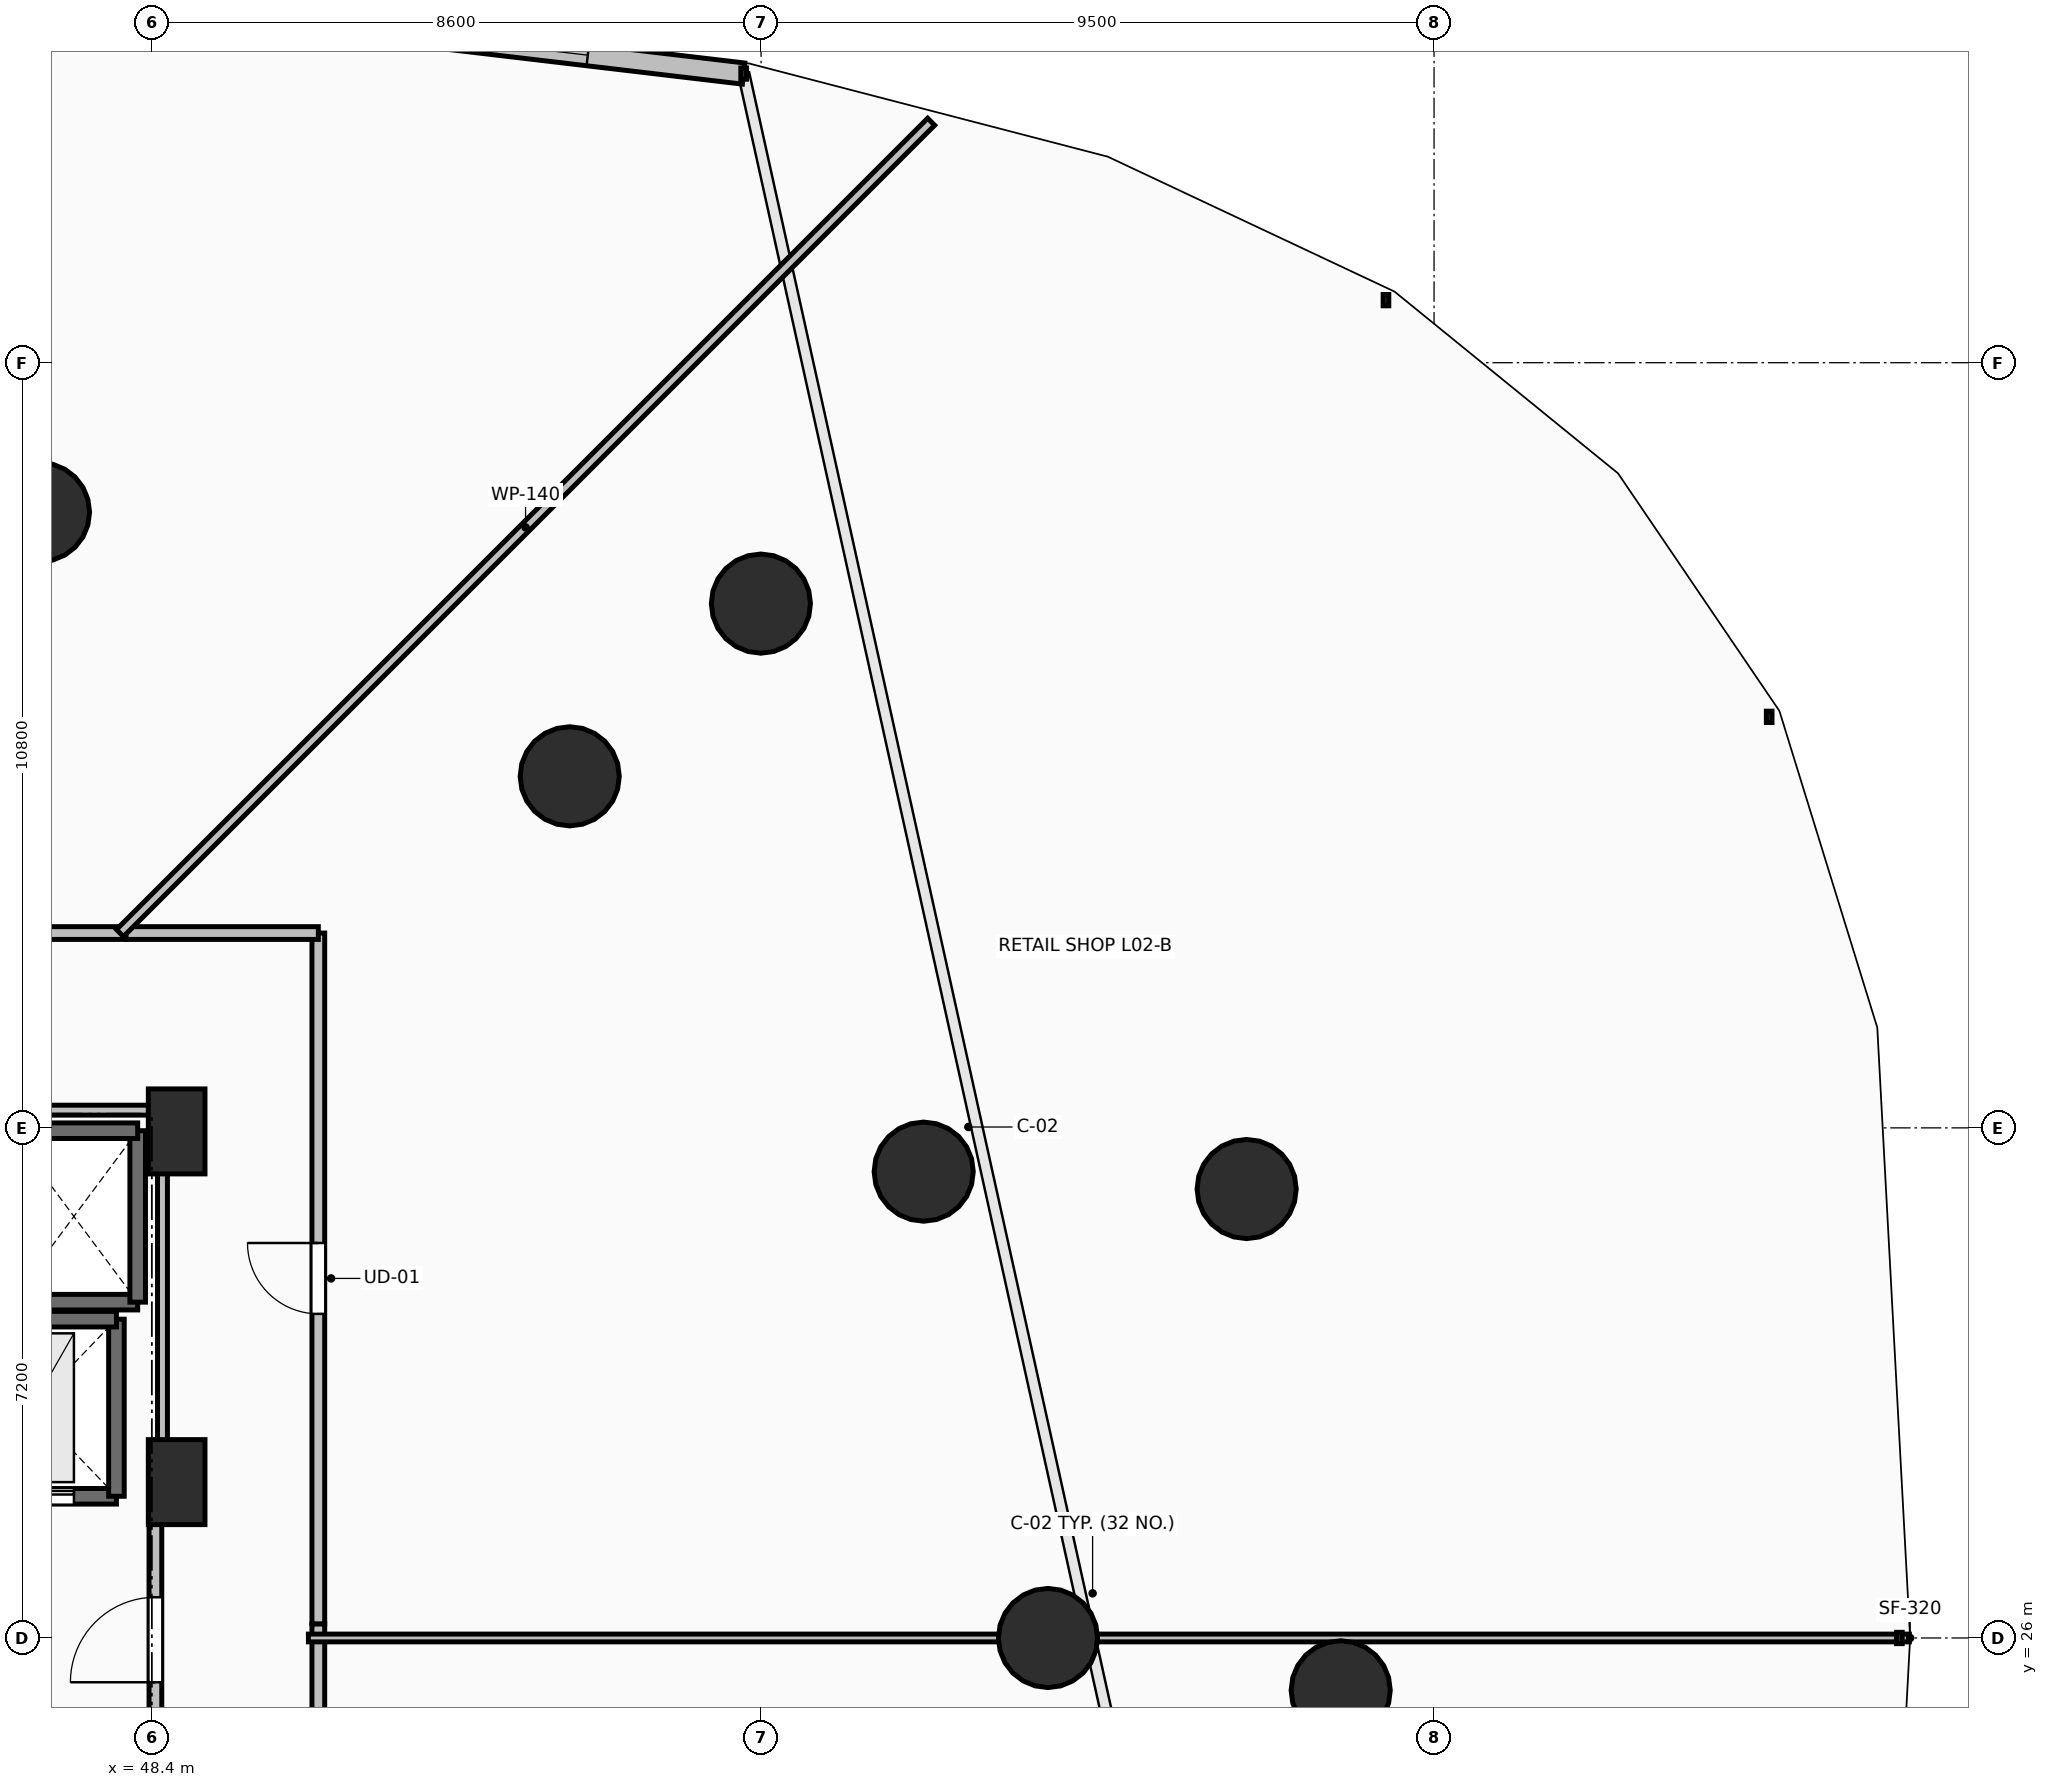
"""IFC4 building model, lengths in metres.
Left out: names, types, materials, properties, quantities, classifications, styles, units other than length and angle.
Written with IfcOpenShell. Run it as: python <this file> out.ifc"""

import sys

from ifc_helpers import new_model, si_unit, direction, frame, frame_2d, origin, origin_2d, place, context, subcontext, project, spatial, rectangle, circle, extrude, element, fill, save


model = new_model("IFC4")
c1 = context("Model", 3, precision=1e-05, world=origin(), true_north=direction((0.0, 1.0)))
c2 = subcontext(c1, "Body", "Model", "MODEL_VIEW")
j1 = project(units=[si_unit("LENGTHUNIT", "METRE"), si_unit("PLANEANGLEUNIT", "RADIAN")], contexts=[c1])
p1 = place(None, origin())
s1 = spatial("IfcSite", under=j1, at=p1, CompositionType="ELEMENT")
p2 = place(p1, origin())
s2 = spatial("IfcBuilding", under=s1, at=p2, CompositionType="ELEMENT")
p3 = place(p2, frame((0.0, 0.0, 9.6)))
s3 = spatial("IfcBuildingStorey", under=s2, at=p3, CompositionType="ELEMENT", Elevation=9.6)
for number, where, z_axis, x_axis in (
    (1, (61.05, 26.0, 0.0), (0.0, 0.0, 1.0), (1.0, 0.0, 0.0)),
    (2, (59.295, 32.582, 0.0), (0.0, 0.0, 1.0), (0.924, 0.383, 0.0)),
    (3, (54.299, 38.162, 0.0), (0.0, 0.0, 1.0), (0.707, 0.707, 0.0)),
    (4, (46.821, 41.891, 0.0), (0.0, 0.0, 1.0), (0.383, 0.924, 0.0)),
    (5, (65.182, 25.261, 0.0), (0.0, 0.0, 1.0), (1.0, 0.0, 0.0)),
    (6, (63.854, 32.337, 0.0), (0.0, 0.0, 1.0), (0.924, 0.383, 0.0)),
    (7, (56.997, 40.6, 0.0), (0.0, 0.0, 1.0), (0.707, 0.707, 0.0)),
):
    element("IfcColumn", number, at=place(p3, frame(where, z_axis=z_axis, x_axis=x_axis)), inside=s3, PredefinedType="COLUMN", context=c2, shape_type="SweptSolid", body=[
        extrude(circle(Radius=0.7, at=origin_2d()), origin(), (0.0, 0.0, 1.0), 4.8),
    ])
for number, where, z_axis, x_axis in (
    (8, (48.75, 33.15, 0.0), (0.0, 0.0, 1.0), (1.0, 0.0, 0.0)),
    (9, (48.75, 28.2, 0.0), (0.0, 0.0, 1.0), (1.0, 0.0, 0.0)),
):
    element("IfcColumn", number, at=place(p3, frame(where, z_axis=z_axis, x_axis=x_axis)), inside=s3, PredefinedType="PILASTER", context=c2, shape_type="SweptSolid", body=[
        extrude(rectangle(XDim=0.8, YDim=1.2, at=origin_2d()), origin(), (0.0, 0.0, 1.0), 4.8),
    ])
p4 = place(p3, frame((56.754, 48.081, 0.0), z_axis=(0.0, 0.0, 1.0), x_axis=(-0.99311278541, 0.117162261226, 0.0)))
e10 = element("IfcWall", 10, at=p4, inside=s3, PredefinedType="STANDARD", context=c2, shape_type="SweptSolid", body=[
    extrude(rectangle(XDim=6.531, YDim=0.3, at=frame_2d((3.265, 0.0))), origin(), (0.0, 0.0, 1.0), 4.48),
])
p5 = place(p4, frame((2.215, 0.0, 0.85)))
e11 = element("IfcOpeningElement", 11, at=p5, cuts=e10, PredefinedType="OPENING", context=c2, shape_type="SweptSolid", body=[
    extrude(rectangle(XDim=2.1, YDim=2.8, at=frame_2d((1.05, 1.4))), frame((0.0, 0.165, 0.0), z_axis=(0.0, -1.0, 0.0), x_axis=(1.0, 0.0, 0.0)), (0.0, 0.0, 1.0), 0.33),
])
p6 = place(p3, frame((46.4, 30.74, 0.0), z_axis=(0.0, 0.0, 1.0), x_axis=(1.0, 0.0, 0.0)))
e12 = element("IfcWall", 12, at=p6, inside=s3, PredefinedType="SOLIDWALL", context=c2, shape_type="SweptSolid", body=[
    extrude(rectangle(XDim=1.8, YDim=0.22, at=frame_2d((0.9, 0.0))), origin(), (0.0, 0.0, 1.0), 4.48),
])
p7 = place(p3, frame((48.2, 30.74, 0.0), z_axis=(0.0, 0.0, 1.0), x_axis=(0.0, 1.0, 0.0)))
e13 = element("IfcWall", 13, at=p7, inside=s3, PredefinedType="SOLIDWALL", context=c2, shape_type="SweptSolid", body=[
    extrude(rectangle(XDim=2.42, YDim=0.22, at=frame_2d((1.21, 0.0))), origin(), (0.0, 0.0, 1.0), 4.48),
])
p8 = place(p3, frame((48.2, 33.16, 0.0), z_axis=(0.0, 0.0, 1.0), x_axis=(-1.0, 0.0, 0.0)))
e14 = element("IfcWall", 14, at=p8, inside=s3, PredefinedType="SOLIDWALL", context=c2, shape_type="SweptSolid", body=[
    extrude(rectangle(XDim=1.8, YDim=0.22, at=frame_2d((0.9, 0.0))), origin(), (0.0, 0.0, 1.0), 4.48),
])
p9 = place(p3, frame((45.5, 28.0, 0.0), z_axis=(0.0, 0.0, 1.0), x_axis=(1.0, 0.0, 0.0)))
e15 = element("IfcWall", 15, at=p9, inside=s3, PredefinedType="SHEAR", context=c2, shape_type="SweptSolid", body=[
    extrude(rectangle(XDim=2.4, YDim=0.22, at=frame_2d((1.2, 0.0))), origin(), (0.0, 0.0, 1.0), 4.48),
])
p10 = place(p9, frame((0.6, 0.0, 0.0)))
e16 = element("IfcOpeningElement", 16, at=p10, cuts=e15, PredefinedType="OPENING", context=c2, shape_type="SweptSolid", body=[
    extrude(rectangle(XDim=1.2, YDim=2.2, at=frame_2d((0.6, 1.1))), frame((0.0, 0.125, 0.0), z_axis=(0.0, -1.0, 0.0), x_axis=(1.0, 0.0, 0.0)), (0.0, 0.0, 1.0), 0.25),
])
p11 = place(p3, frame((47.9, 28.0, 0.0), z_axis=(0.0, 0.0, 1.0), x_axis=(0.0, 1.0, 0.0)))
e17 = element("IfcWall", 17, at=p11, inside=s3, PredefinedType="SHEAR", context=c2, shape_type="SweptSolid", body=[
    extrude(rectangle(XDim=2.5, YDim=0.22, at=frame_2d((1.25, 0.0))), origin(), (0.0, 0.0, 1.0), 4.48),
])
p12 = place(p3, frame((47.9, 30.5, 0.0), z_axis=(0.0, 0.0, 1.0), x_axis=(-1.0, 0.0, 0.0)))
e18 = element("IfcWall", 18, at=p12, inside=s3, PredefinedType="SHEAR", context=c2, shape_type="SweptSolid", body=[
    extrude(rectangle(XDim=2.4, YDim=0.22, at=frame_2d((1.2, 0.0))), origin(), (0.0, 0.0, 1.0), 4.48),
])
p13 = place(p3, frame((48.45, 23.95, 0.0), z_axis=(0.0, 0.0, 1.0), x_axis=(0.0, 1.0, 0.0)))
e19 = element("IfcWall", 19, at=p13, inside=s3, PredefinedType="PARTITIONING", context=c2, shape_type="SweptSolid", body=[
    extrude(rectangle(XDim=4.05, YDim=0.18, at=frame_2d((2.025, 0.0))), origin(), (0.0, 0.0, 1.0), 4.48),
])
p14 = place(p13, frame((1.425, 0.0, 0.0)))
e20 = element("IfcOpeningElement", 20, at=p14, cuts=e19, PredefinedType="OPENING", context=c2, shape_type="SweptSolid", body=[
    extrude(rectangle(XDim=1.2, YDim=2.15, at=frame_2d((0.6, 1.075))), frame((0.0, 0.105, 0.0), z_axis=(0.0, -1.0, 0.0), x_axis=(1.0, 0.0, 0.0)), (0.0, 0.0, 1.0), 0.21),
])
p15 = place(p3, frame((48.035, 35.95, 0.0), z_axis=(0.0, 0.0, 1.0), x_axis=(-1.0, 0.0, 0.0)))
e21 = element("IfcWall", 21, at=p15, inside=s3, PredefinedType="PARTITIONING", context=c2, shape_type="SweptSolid", body=[
    extrude(rectangle(XDim=14.221, YDim=0.18, at=frame_2d((7.11, 0.0))), origin(), (0.0, 0.0, 1.0), 3.672),
])
p16 = place(p15, frame((6.611, 0.0, 0.0)))
e22 = element("IfcOpeningElement", 22, at=p16, cuts=e21, PredefinedType="OPENING", context=c2, shape_type="SweptSolid", body=[
    extrude(rectangle(XDim=1.0, YDim=2.15, at=frame_2d((0.5, 1.075))), frame((0.0, 0.105, 0.0), z_axis=(0.0, -1.0, 0.0), x_axis=(1.0, 0.0, 0.0)), (0.0, 0.0, 1.0), 0.21),
])
p17 = place(p3, frame((50.75, 13.96, 0.0), z_axis=(0.0, 0.0, 1.0), x_axis=(0.0, 1.0, 0.0)))
e23 = element("IfcWall", 23, at=p17, inside=s3, PredefinedType="PARTITIONING", context=c2, shape_type="SweptSolid", body=[
    extrude(rectangle(XDim=12.24, YDim=0.18, at=frame_2d((6.12, 0.0))), origin(), (0.0, 0.0, 1.0), 3.672),
])
p18 = place(p17, frame((5.62, 0.0, 0.0)))
e24 = element("IfcOpeningElement", 24, at=p18, cuts=e23, PredefinedType="OPENING", context=c2, shape_type="SweptSolid", body=[
    extrude(rectangle(XDim=1.0, YDim=2.15, at=frame_2d((0.5, 1.075))), frame((0.0, 0.105, 0.0), z_axis=(0.0, -1.0, 0.0), x_axis=(1.0, 0.0, 0.0)), (0.0, 0.0, 1.0), 0.21),
])
p19 = place(p3, frame((50.75, 26.2, 0.0), z_axis=(0.0, 0.0, 1.0), x_axis=(0.0, 1.0, 0.0)))
e25 = element("IfcWall", 25, at=p19, inside=s3, PredefinedType="PARTITIONING", context=c2, shape_type="SweptSolid", body=[
    extrude(rectangle(XDim=9.75, YDim=0.18, at=frame_2d((4.875, 0.0))), origin(), (0.0, 0.0, 1.0), 3.672),
])
p20 = place(p19, frame((4.375, 0.0, 0.0)))
e26 = element("IfcOpeningElement", 26, at=p20, cuts=e25, PredefinedType="OPENING", context=c2, shape_type="SweptSolid", body=[
    extrude(rectangle(XDim=1.0, YDim=2.15, at=frame_2d((0.5, 1.075))), frame((0.0, 0.105, 0.0), z_axis=(0.0, -1.0, 0.0), x_axis=(1.0, 0.0, 0.0)), (0.0, 0.0, 1.0), 0.21),
])
p21 = place(p3, frame((50.75, 35.95, 0.0), z_axis=(0.0, 0.0, 1.0), x_axis=(-1.0, 0.0, 0.0)))
e27 = element("IfcWall", 27, at=p21, inside=s3, PredefinedType="PARTITIONING", context=c2, shape_type="SweptSolid", body=[
    extrude(rectangle(XDim=2.715, YDim=0.18, at=frame_2d((1.357, 0.0))), origin(), (0.0, 0.0, 1.0), 3.672),
])
p22 = place(p3, frame((47.95, 35.95, 0.0), z_axis=(0.0, 0.0, 1.0), x_axis=(0.707106781187, 0.707106781187, 0.0)))
e28 = element("IfcWall", 28, at=p22, inside=s3, PredefinedType="PARTITIONING", context=c2, shape_type="SweptSolid", body=[
    extrude(rectangle(XDim=16.194, YDim=0.14, at=frame_2d((8.097, 0.0))), origin(), (0.0, 0.0, 1.0), 3.672),
])
p23 = place(p3, frame((73.21, 26.0, 0.0), z_axis=(0.0, 0.0, 1.0), x_axis=(-1.0, 0.0, 0.0)))
e29 = element("IfcWall", 29, at=p23, inside=s3, PredefinedType="PARTITIONING", context=c2, shape_type="SweptSolid", body=[
    extrude(rectangle(XDim=22.6, YDim=0.11, at=frame_2d((11.3, 0.0))), origin(), (0.0, 0.0, 1.0), 3.672),
])
p24 = place(p3, frame((44.34, 33.45, 0.0), z_axis=(0.0, 0.0, 1.0), x_axis=(1.0, 0.0, 0.0)))
e30 = element("IfcWall", 30, at=p24, inside=s3, PredefinedType="PARTITIONING", context=c2, shape_type="SweptSolid", body=[
    extrude(rectangle(XDim=4.21, YDim=0.14, at=frame_2d((2.105, 0.0))), origin(), (0.0, 0.0, 1.0), 3.672),
])
p25 = place(p3, frame((48.55, 33.45, 0.0), z_axis=(0.0, 0.0, 1.0), x_axis=(0.0, -1.0, 0.0)))
e31 = element("IfcWall", 31, at=p25, inside=s3, PredefinedType="PARTITIONING", context=c2, shape_type="SweptSolid", body=[
    extrude(rectangle(XDim=5.254, YDim=0.14, at=frame_2d((2.627, 0.0))), origin(), (0.0, 0.0, 1.0), 3.672),
])
p26 = place(p5, origin())
e32 = element("IfcWindow", 32, at=p26, inside=s3, PartitioningType="SINGLE_PANEL", PredefinedType="WINDOW", context=c2, shape_type="SweptSolid", body=[
    extrude(rectangle(XDim=2.1, YDim=2.8, at=frame_2d((1.05, 1.4))), frame((0.0, 0.03, 0.0), z_axis=(0.0, -1.0, 0.0), x_axis=(1.0, 0.0, 0.0)), (0.0, 0.0, 1.0), 0.06),
])
fill(e11, e32)
p27 = place(p10, origin())
e33 = element("IfcDoor", 33, at=p27, inside=s3, OperationType="SLIDING_TO_LEFT", PredefinedType="DOOR", context=c2, shape_type="SweptSolid", body=[
    extrude(rectangle(XDim=1.2, YDim=2.2, at=frame_2d((0.6, 1.1))), frame((0.0, 0.025, 0.0), z_axis=(0.0, -1.0, 0.0), x_axis=(1.0, 0.0, 0.0)), (0.0, 0.0, 1.0), 0.05),
])
fill(e16, e33)
p28 = place(p14, origin())
e34 = element("IfcDoor", 34, at=p28, inside=s3, OperationType="SINGLE_SWING_LEFT", PredefinedType="DOOR", context=c2, shape_type="SweptSolid", body=[
    extrude(rectangle(XDim=1.2, YDim=2.15, at=frame_2d((0.6, 1.075))), frame((0.0, 0.025, 0.0), z_axis=(0.0, -1.0, 0.0), x_axis=(1.0, 0.0, 0.0)), (0.0, 0.0, 1.0), 0.05),
])
fill(e20, e34)
p29 = place(p20, origin())
e35 = element("IfcDoor", 35, at=p29, inside=s3, OperationType="SINGLE_SWING_RIGHT", PredefinedType="DOOR", context=c2, shape_type="SweptSolid", body=[
    extrude(rectangle(XDim=1.0, YDim=2.15, at=frame_2d((0.5, 1.075))), frame((0.0, 0.025, 0.0), z_axis=(0.0, -1.0, 0.0), x_axis=(1.0, 0.0, 0.0)), (0.0, 0.0, 1.0), 0.05),
])
fill(e26, e35)
save(model, sys.argv[1])
